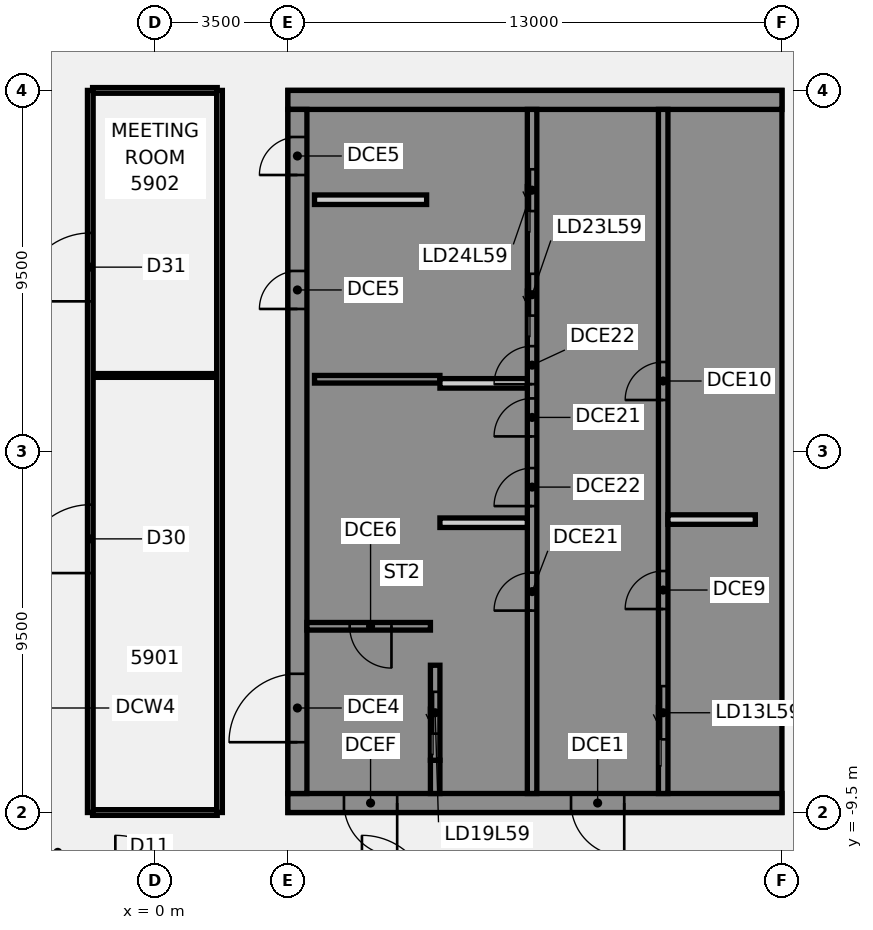
"""IFC4 building model, lengths in metres.
Left out: names, types, materials, properties, quantities, classifications, styles, units other than length and angle.
Written with IfcOpenShell. Run it as: python <this file> out.ifc"""

import sys

from ifc_helpers import new_model, si_unit, direction, frame, frame_2d, origin, place, context, subcontext, project, spatial, polyline, rectangle, outline, extrude, element, fill, save


model = new_model("IFC4")
c1 = context("Model", 3, precision=1e-05, world=origin(), true_north=direction((0.0, 1.0)))
c2 = subcontext(c1, "Body", "Model", "MODEL_VIEW")
j1 = project(units=[si_unit("LENGTHUNIT", "METRE"), si_unit("PLANEANGLEUNIT", "RADIAN")], contexts=[c1])
p1 = place(None, origin())
s1 = spatial("IfcSite", under=j1, at=p1, CompositionType="ELEMENT")
p2 = place(p1, origin())
s2 = spatial("IfcBuilding", under=s1, at=p2, CompositionType="ELEMENT")
p3 = place(p2, frame((0.0, 0.0, 234.3)))
s3 = spatial("IfcBuildingStorey", under=s2, at=p3, CompositionType="ELEMENT", Elevation=234.3)
p4 = place(p3, frame((-1.64, -9.5, 0.0), z_axis=(0.0, 0.0, 1.0), x_axis=(1.0, 0.0, 0.0)))
e1 = element("IfcWall", 1, at=p4, inside=s3, PredefinedType="PARTITIONING", context=c2, shape_type="SweptSolid", body=[
    extrude(rectangle(XDim=3.28, YDim=0.15, at=frame_2d((1.64, 0.0))), origin(), (0.0, 0.0, 1.0), 2.864),
])
p5 = place(p3, frame((-1.64, 2.0, 0.0), z_axis=(0.0, 0.0, 1.0), x_axis=(1.0, 0.0, 0.0)))
e2 = element("IfcWall", 2, at=p5, inside=s3, PredefinedType="PARTITIONING", context=c2, shape_type="SweptSolid", body=[
    extrude(rectangle(XDim=3.28, YDim=0.1, at=frame_2d((1.64, 0.0))), origin(), (0.0, 0.0, 1.0), 2.864),
])
p6 = place(p3, frame((-1.64, 9.5, 0.0), z_axis=(0.0, 0.0, 1.0), x_axis=(1.0, 0.0, 0.0)))
e3 = element("IfcWall", 3, at=p6, inside=s3, PredefinedType="PARTITIONING", context=c2, shape_type="SweptSolid", body=[
    extrude(rectangle(XDim=3.28, YDim=0.15, at=frame_2d((1.64, 0.0))), origin(), (0.0, 0.0, 1.0), 2.864),
])
p7 = place(p3, frame((-1.7, -9.5, 0.0), z_axis=(0.0, 0.0, 1.0), x_axis=(0.0, 1.0, 0.0)))
e4 = element("IfcWall", 4, at=p7, inside=s3, PredefinedType="PARTITIONING", context=c2, shape_type="SweptSolid", body=[
    extrude(rectangle(XDim=19.0, YDim=0.15, at=frame_2d((9.5, 0.0))), origin(), (0.0, 0.0, 1.0), 2.864),
])
p8 = place(p7, frame((6.3, 0.0, 0.0)))
e5 = element("IfcOpeningElement", 5, at=p8, cuts=e4, PredefinedType="OPENING", context=c2, shape_type="SweptSolid", body=[
    extrude(rectangle(XDim=1.8, YDim=2.1, at=frame_2d((0.9, 1.05))), frame((0.0, 0.085, 0.0), z_axis=(0.0, -1.0, 0.0), x_axis=(1.0, 0.0, 0.0)), (0.0, 0.0, 1.0), 0.17),
])
p9 = place(p7, frame((13.45, 0.0, 0.0)))
e6 = element("IfcOpeningElement", 6, at=p9, cuts=e4, PredefinedType="OPENING", context=c2, shape_type="SweptSolid", body=[
    extrude(rectangle(XDim=1.8, YDim=2.1, at=frame_2d((0.9, 1.05))), frame((0.0, 0.085, 0.0), z_axis=(0.0, -1.0, 0.0), x_axis=(1.0, 0.0, 0.0)), (0.0, 0.0, 1.0), 0.17),
])
p10 = place(p3, frame((1.7, -9.5, 0.0), z_axis=(0.0, 0.0, 1.0), x_axis=(0.0, 1.0, 0.0)))
e7 = element("IfcWall", 7, at=p10, inside=s3, PredefinedType="PARTITIONING", context=c2, shape_type="SweptSolid", body=[
    extrude(rectangle(XDim=19.0, YDim=0.15, at=frame_2d((9.5, 0.0))), origin(), (0.0, 0.0, 1.0), 2.864),
])
p11 = place(p3, frame((16.5, -9.25, 0.0), z_axis=(0.0, 0.0, 1.0), x_axis=(-1.0, 0.0, 0.0)))
e8 = element("IfcWall", 8, at=p11, inside=s3, PredefinedType="SHEAR", context=c2, shape_type="SweptSolid", body=[
    extrude(rectangle(XDim=13.0, YDim=0.5, at=frame_2d((6.5, 0.0))), origin(), (0.0, 0.0, 1.0), 3.46),
])
p12 = place(p11, frame((4.15, 0.0, 0.0)))
e9 = element("IfcOpeningElement", 9, at=p12, cuts=e8, PredefinedType="OPENING", context=c2, shape_type="SweptSolid", body=[
    extrude(rectangle(XDim=1.4, YDim=2.1, at=frame_2d((0.7, 1.05))), frame((0.0, 0.26, 0.0), z_axis=(0.0, -1.0, 0.0), x_axis=(1.0, 0.0, 0.0)), (0.0, 0.0, 1.0), 0.52),
])
p13 = place(p11, frame((10.125, 0.0, 0.0)))
e10 = element("IfcOpeningElement", 10, at=p13, cuts=e8, PredefinedType="OPENING", context=c2, shape_type="SweptSolid", body=[
    extrude(rectangle(XDim=1.4, YDim=2.1, at=frame_2d((0.7, 1.05))), frame((0.0, 0.26, 0.0), z_axis=(0.0, -1.0, 0.0), x_axis=(1.0, 0.0, 0.0)), (0.0, 0.0, 1.0), 0.52),
])
p14 = place(p3, origin())
e11 = element("IfcWall", 11, at=p14, inside=s3, PredefinedType="SHEAR", context=c2, shape_type="SweptSolid", body=[
    extrude(outline(polyline([(13.5, -8.125), (13.5, -9.0), (16.0, -9.0), (16.5, -9.0), (16.5, 9.0), (16.0, 9.0), (13.5, 9.0), (13.5, 8.125), (16.0, 8.125), (16.0, 5.625), (13.5, 5.625), (13.5, 5.375), (16.0, 5.375), (16.0, -5.375), (13.5, -5.375), (13.5, -5.625), (16.0, -5.625), (16.0, -8.125), (13.5, -8.125)])), origin(), (0.0, 0.0, 1.0), 3.46),
])
p15 = place(p3, frame((16.5, 9.25, 0.0), z_axis=(0.0, 0.0, 1.0), x_axis=(-1.0, 0.0, 0.0)))
e12 = element("IfcWall", 12, at=p15, inside=s3, PredefinedType="SHEAR", context=c2, shape_type="SweptSolid", body=[
    extrude(rectangle(XDim=13.0, YDim=0.5, at=frame_2d((6.5, 0.0))), origin(), (0.0, 0.0, 1.0), 3.46),
])
p16 = place(p3, origin())
e13 = element("IfcWall", 13, at=p16, inside=s3, PredefinedType="SHEAR", context=c2, shape_type="SweptSolid", body=[
    extrude(outline(polyline([(9.8, -5.375), (7.5, -5.375), (7.5, 2.625), (9.8, 2.625), (9.8, 2.875), (7.5, 2.875), (7.5, 5.375), (9.8, 5.375), (9.8, 5.625), (7.5, 5.625), (7.5, 8.125), (9.8, 8.125), (9.8, 9.0), (7.5, 9.0), (7.25, 9.0), (7.25, -5.625), (7.5, -5.625), (9.8, -5.625), (9.8, -5.375)])), origin(), (0.0, 0.0, 1.0), 3.46),
])
p17 = place(p3, origin())
e14 = element("IfcWall", 14, at=p17, inside=s3, PredefinedType="SHEAR", context=c2, shape_type="SweptSolid", body=[
    extrude(outline(polyline([(7.5, -8.125), (7.5, -9.0), (9.8, -9.0), (9.8, -8.125), (9.8, -5.625), (9.55, -5.625), (9.55, -8.125), (7.5, -8.125)])), origin(), (0.0, 0.0, 1.0), 3.46),
])
p18 = place(p3, frame((7.375, -9.0, 0.0), z_axis=(0.0, 0.0, 1.0), x_axis=(0.0, 1.0, 0.0)))
e15 = element("IfcWall", 15, at=p18, inside=s3, PredefinedType="SHEAR", context=c2, shape_type="SweptSolid", body=[
    extrude(rectangle(XDim=0.875, YDim=0.25, at=frame_2d((0.438, 0.0))), origin(), (0.0, 0.0, 1.0), 3.46),
])
p19 = place(p3, frame((7.5, 1.9, 0.0), z_axis=(0.0, 0.0, 1.0), x_axis=(-1.0, 0.0, 0.0)))
e16 = element("IfcWall", 16, at=p19, inside=s3, PredefinedType="SHEAR", context=c2, shape_type="SweptSolid", body=[
    extrude(rectangle(XDim=3.3, YDim=0.2, at=frame_2d((1.65, 0.0))), origin(), (0.0, 0.0, 1.0), 3.46),
])
p20 = place(p3, frame((13.375, -9.0, 0.0), z_axis=(0.0, 0.0, 1.0), x_axis=(0.0, 1.0, 0.0)))
e17 = element("IfcWall", 17, at=p20, inside=s3, PredefinedType="SHEAR", context=c2, shape_type="SweptSolid", body=[
    extrude(rectangle(XDim=18.0, YDim=0.25, at=frame_2d((9.0, 0.0))), origin(), (0.0, 0.0, 1.0), 3.46),
])
p21 = place(p20, frame((1.425, 0.0, 0.0)))
e18 = element("IfcOpeningElement", 18, at=p21, cuts=e17, PredefinedType="OPENING", context=c2, shape_type="SweptSolid", body=[
    extrude(rectangle(XDim=1.4, YDim=2.1, at=frame_2d((0.7, 1.05))), frame((0.0, 0.135, 0.0), z_axis=(0.0, -1.0, 0.0), x_axis=(1.0, 0.0, 0.0)), (0.0, 0.0, 1.0), 0.27),
])
p22 = place(p20, frame((4.854, 0.0, 0.0)))
e19 = element("IfcOpeningElement", 19, at=p22, cuts=e17, PredefinedType="OPENING", context=c2, shape_type="SweptSolid", body=[
    extrude(rectangle(XDim=1.0, YDim=2.1, at=frame_2d((0.5, 1.05))), frame((0.0, 0.135, 0.0), z_axis=(0.0, -1.0, 0.0), x_axis=(1.0, 0.0, 0.0)), (0.0, 0.0, 1.0), 0.27),
])
p23 = place(p20, frame((10.354, 0.0, 0.0)))
e20 = element("IfcOpeningElement", 20, at=p23, cuts=e17, PredefinedType="OPENING", context=c2, shape_type="SweptSolid", body=[
    extrude(rectangle(XDim=1.0, YDim=2.1, at=frame_2d((0.5, 1.05))), frame((0.0, 0.135, 0.0), z_axis=(0.0, -1.0, 0.0), x_axis=(1.0, 0.0, 0.0)), (0.0, 0.0, 1.0), 0.27),
])
p24 = place(p3, frame((9.925, -9.0, 0.0), z_axis=(0.0, 0.0, 1.0), x_axis=(0.0, 1.0, 0.0)))
e21 = element("IfcWall", 21, at=p24, inside=s3, PredefinedType="SHEAR", context=c2, shape_type="SweptSolid", body=[
    extrude(rectangle(XDim=18.0, YDim=0.25, at=frame_2d((9.0, 0.0))), origin(), (0.0, 0.0, 1.0), 3.46),
])
p25 = place(p24, frame((12.575, 0.0, 0.0)))
e22 = element("IfcOpeningElement", 22, at=p25, cuts=e21, PredefinedType="OPENING", context=c2, shape_type="SweptSolid", body=[
    extrude(rectangle(XDim=1.1, YDim=2.1, at=frame_2d((0.55, 1.05))), frame((0.0, 0.135, 0.0), z_axis=(0.0, -1.0, 0.0), x_axis=(1.0, 0.0, 0.0)), (0.0, 0.0, 1.0), 0.27),
])
p26 = place(p24, frame((15.325, 0.0, 0.0)))
e23 = element("IfcOpeningElement", 23, at=p26, cuts=e21, PredefinedType="OPENING", context=c2, shape_type="SweptSolid", body=[
    extrude(rectangle(XDim=1.1, YDim=2.1, at=frame_2d((0.55, 1.05))), frame((0.0, 0.135, 0.0), z_axis=(0.0, -1.0, 0.0), x_axis=(1.0, 0.0, 0.0)), (0.0, 0.0, 1.0), 0.27),
])
p27 = place(p24, frame((4.812, 0.0, 0.0)))
e24 = element("IfcOpeningElement", 24, at=p27, cuts=e21, PredefinedType="OPENING", context=c2, shape_type="SweptSolid", body=[
    extrude(rectangle(XDim=1.0, YDim=2.1, at=frame_2d((0.5, 1.05))), frame((0.0, 0.135, 0.0), z_axis=(0.0, -1.0, 0.0), x_axis=(1.0, 0.0, 0.0)), (0.0, 0.0, 1.0), 0.27),
])
p28 = place(p24, frame((7.562, 0.0, 0.0)))
e25 = element("IfcOpeningElement", 25, at=p28, cuts=e21, PredefinedType="OPENING", context=c2, shape_type="SweptSolid", body=[
    extrude(rectangle(XDim=1.0, YDim=2.1, at=frame_2d((0.5, 1.05))), frame((0.0, 0.135, 0.0), z_axis=(0.0, -1.0, 0.0), x_axis=(1.0, 0.0, 0.0)), (0.0, 0.0, 1.0), 0.27),
])
p29 = place(p24, frame((9.396, 0.0, 0.0)))
e26 = element("IfcOpeningElement", 26, at=p29, cuts=e21, PredefinedType="OPENING", context=c2, shape_type="SweptSolid", body=[
    extrude(rectangle(XDim=1.0, YDim=2.1, at=frame_2d((0.5, 1.05))), frame((0.0, 0.135, 0.0), z_axis=(0.0, -1.0, 0.0), x_axis=(1.0, 0.0, 0.0)), (0.0, 0.0, 1.0), 0.27),
])
p30 = place(p24, frame((10.771, 0.0, 0.0)))
e27 = element("IfcOpeningElement", 27, at=p30, cuts=e21, PredefinedType="OPENING", context=c2, shape_type="SweptSolid", body=[
    extrude(rectangle(XDim=1.0, YDim=2.1, at=frame_2d((0.5, 1.05))), frame((0.0, 0.135, 0.0), z_axis=(0.0, -1.0, 0.0), x_axis=(1.0, 0.0, 0.0)), (0.0, 0.0, 1.0), 0.27),
])
p31 = place(p3, frame((7.375, -8.125, 0.0), z_axis=(0.0, 0.0, 1.0), x_axis=(0.0, 1.0, 0.0)))
e28 = element("IfcWall", 28, at=p31, inside=s3, PredefinedType="SHEAR", context=c2, shape_type="SweptSolid", body=[
    extrude(rectangle(XDim=2.5, YDim=0.25, at=frame_2d((1.25, 0.0))), origin(), (0.0, 0.0, 1.0), 3.46),
])
p32 = place(p31, frame((0.7, 0.0, 0.0)))
e29 = element("IfcOpeningElement", 29, at=p32, cuts=e28, PredefinedType="OPENING", context=c2, shape_type="SweptSolid", body=[
    extrude(rectangle(XDim=1.1, YDim=2.1, at=frame_2d((0.55, 1.05))), frame((0.0, 0.135, 0.0), z_axis=(0.0, -1.0, 0.0), x_axis=(1.0, 0.0, 0.0)), (0.0, 0.0, 1.0), 0.27),
])
p33 = place(p3, frame((3.75, -9.0, 0.0), z_axis=(0.0, 0.0, 1.0), x_axis=(0.0, 1.0, 0.0)))
e30 = element("IfcWall", 30, at=p33, inside=s3, PredefinedType="SHEAR", context=c2, shape_type="SweptSolid", body=[
    extrude(rectangle(XDim=18.0, YDim=0.5, at=frame_2d((9.0, 0.0))), origin(), (0.0, 0.0, 1.0), 3.46),
])
p34 = place(p33, frame((1.35, 0.0, 0.0)))
e31 = element("IfcOpeningElement", 31, at=p34, cuts=e30, PredefinedType="OPENING", context=c2, shape_type="SweptSolid", body=[
    extrude(rectangle(XDim=1.8, YDim=2.1, at=frame_2d((0.9, 1.05))), frame((0.0, 0.26, 0.0), z_axis=(0.0, -1.0, 0.0), x_axis=(1.0, 0.0, 0.0)), (0.0, 0.0, 1.0), 0.52),
])
p35 = place(p33, frame((12.75, 0.0, 0.0)))
e32 = element("IfcOpeningElement", 32, at=p35, cuts=e30, PredefinedType="OPENING", context=c2, shape_type="SweptSolid", body=[
    extrude(rectangle(XDim=1.0, YDim=2.1, at=frame_2d((0.5, 1.05))), frame((0.0, 0.26, 0.0), z_axis=(0.0, -1.0, 0.0), x_axis=(1.0, 0.0, 0.0)), (0.0, 0.0, 1.0), 0.52),
])
p36 = place(p33, frame((16.274, 0.0, 0.0)))
e33 = element("IfcOpeningElement", 33, at=p36, cuts=e30, PredefinedType="OPENING", context=c2, shape_type="SweptSolid", body=[
    extrude(rectangle(XDim=1.0, YDim=2.1, at=frame_2d((0.5, 1.05))), frame((0.0, 0.26, 0.0), z_axis=(0.0, -1.0, 0.0), x_axis=(1.0, 0.0, 0.0)), (0.0, 0.0, 1.0), 0.52),
])
p37 = place(p3, frame((7.15, 6.624, 0.0), z_axis=(0.0, 0.0, 1.0), x_axis=(-1.0, 0.0, 0.0)))
e34 = element("IfcWall", 34, at=p37, inside=s3, PredefinedType="PARTITIONING", context=c2, shape_type="SweptSolid", body=[
    extrude(rectangle(XDim=2.95, YDim=0.25, at=frame_2d((1.475, 0.0))), origin(), (0.0, 0.0, 1.0), 3.46),
])
p38 = place(p3, frame((7.25, -4.6, 0.0), z_axis=(0.0, 0.0, 1.0), x_axis=(-1.0, 0.0, 0.0)))
e35 = element("IfcWall", 35, at=p38, inside=s3, PredefinedType="SHEAR", context=c2, shape_type="SweptSolid", body=[
    extrude(rectangle(XDim=3.25, YDim=0.2, at=frame_2d((1.625, 0.0))), origin(), (0.0, 0.0, 1.0), 3.46),
])
p39 = place(p38, frame((1.025, 0.0, 0.0)))
e36 = element("IfcOpeningElement", 36, at=p39, cuts=e35, PredefinedType="OPENING", context=c2, shape_type="SweptSolid", body=[
    extrude(rectangle(XDim=1.1, YDim=2.1, at=frame_2d((0.55, 1.05))), frame((0.0, 0.11, 0.0), z_axis=(0.0, -1.0, 0.0), x_axis=(1.0, 0.0, 0.0)), (0.0, 0.0, 1.0), 0.22),
])
for number, where, z_axis, x_axis in (
    (37, (15.8, -1.792, 0.0), (0.0, 0.0, 1.0), (-1.0, 0.0, 0.0)),
    (38, (9.8, -1.875, 0.0), (0.0, 0.0, 1.0), (-1.0, 0.0, 0.0)),
    (39, (9.8, 1.792, 0.0), (0.0, 0.0, 1.0), (-1.0, 0.0, 0.0)),
):
    element("IfcWall", number, at=place(p3, frame(where, z_axis=z_axis, x_axis=x_axis)), inside=s3, PredefinedType="PARTITIONING", context=c2, shape_type="SweptSolid", body=[
        extrude(rectangle(XDim=2.3, YDim=0.25, at=frame_2d((1.15, 0.0))), origin(), (0.0, 0.0, 1.0), 3.46),
    ])
p40 = place(p8, frame((1.8, 0.0, 0.0), z_axis=(0.0, 0.0, 1.0), x_axis=(-1.0, 0.0, 0.0)))
e40 = element("IfcDoor", 40, at=p40, inside=s3, OperationType="DOUBLE_DOOR_SINGLE_SWING", PredefinedType="DOOR", context=c2, shape_type="SweptSolid", body=[
    extrude(rectangle(XDim=1.8, YDim=2.1, at=frame_2d((0.9, 1.05))), frame((0.0, 0.025, 0.0), z_axis=(0.0, -1.0, 0.0), x_axis=(1.0, 0.0, 0.0)), (0.0, 0.0, 1.0), 0.05),
])
fill(e5, e40)
p41 = place(p9, frame((1.8, 0.0, 0.0), z_axis=(0.0, 0.0, 1.0), x_axis=(-1.0, 0.0, 0.0)))
e41 = element("IfcDoor", 41, at=p41, inside=s3, OperationType="DOUBLE_DOOR_SINGLE_SWING", PredefinedType="DOOR", context=c2, shape_type="SweptSolid", body=[
    extrude(rectangle(XDim=1.8, YDim=2.1, at=frame_2d((0.9, 1.05))), frame((0.0, 0.025, 0.0), z_axis=(0.0, -1.0, 0.0), x_axis=(1.0, 0.0, 0.0)), (0.0, 0.0, 1.0), 0.05),
])
fill(e6, e41)
p42 = place(p12, origin())
e42 = element("IfcDoor", 42, at=p42, inside=s3, OperationType="SINGLE_SWING_LEFT", PredefinedType="DOOR", context=c2, shape_type="SweptSolid", body=[
    extrude(rectangle(XDim=1.4, YDim=2.1, at=frame_2d((0.7, 1.05))), frame((0.0, 0.025, 0.0), z_axis=(0.0, -1.0, 0.0), x_axis=(1.0, 0.0, 0.0)), (0.0, 0.0, 1.0), 0.05),
])
fill(e9, e42)
p43 = place(p13, origin())
e43 = element("IfcDoor", 43, at=p43, inside=s3, OperationType="SINGLE_SWING_LEFT", PredefinedType="DOOR", context=c2, shape_type="SweptSolid", body=[
    extrude(rectangle(XDim=1.4, YDim=2.1, at=frame_2d((0.7, 1.05))), frame((0.0, 0.025, 0.0), z_axis=(0.0, -1.0, 0.0), x_axis=(1.0, 0.0, 0.0)), (0.0, 0.0, 1.0), 0.05),
])
fill(e10, e43)
p44 = place(p34, origin())
e44 = element("IfcDoor", 44, at=p44, inside=s3, OperationType="SINGLE_SWING_LEFT", PredefinedType="DOOR", context=c2, shape_type="SweptSolid", body=[
    extrude(rectangle(XDim=1.8, YDim=2.1, at=frame_2d((0.9, 1.05))), frame((0.0, 0.025, 0.0), z_axis=(0.0, -1.0, 0.0), x_axis=(1.0, 0.0, 0.0)), (0.0, 0.0, 1.0), 0.05),
])
fill(e31, e44)
p45 = place(p35, origin())
e45 = element("IfcDoor", 45, at=p45, inside=s3, OperationType="SINGLE_SWING_LEFT", PredefinedType="DOOR", context=c2, shape_type="SweptSolid", body=[
    extrude(rectangle(XDim=1.0, YDim=2.1, at=frame_2d((0.5, 1.05))), frame((0.0, -0.175, 0.0), z_axis=(0.0, -1.0, 0.0), x_axis=(1.0, 0.0, 0.0)), (0.0, 0.0, 1.0), 0.05),
])
fill(e32, e45)
p46 = place(p36, origin())
e46 = element("IfcDoor", 46, at=p46, inside=s3, OperationType="SINGLE_SWING_LEFT", PredefinedType="DOOR", context=c2, shape_type="SweptSolid", body=[
    extrude(rectangle(XDim=1.0, YDim=2.1, at=frame_2d((0.5, 1.05))), frame((0.0, -0.175, 0.0), z_axis=(0.0, -1.0, 0.0), x_axis=(1.0, 0.0, 0.0)), (0.0, 0.0, 1.0), 0.05),
])
fill(e33, e46)
p47 = place(p39, origin())
e47 = element("IfcDoor", 47, at=p47, inside=s3, OperationType="SINGLE_SWING_LEFT", PredefinedType="DOOR", context=c2, shape_type="SweptSolid", body=[
    extrude(rectangle(XDim=1.1, YDim=2.1, at=frame_2d((0.55, 1.05))), frame((0.0, 0.025, 0.0), z_axis=(0.0, -1.0, 0.0), x_axis=(1.0, 0.0, 0.0)), (0.0, 0.0, 1.0), 0.05),
])
fill(e36, e47)
p48 = place(p21, origin())
e48 = element("IfcDoor", 48, at=p48, inside=s3, OperationType="SLIDING_TO_LEFT", PredefinedType="DOOR", context=c2, shape_type="SweptSolid", body=[
    extrude(rectangle(XDim=1.4, YDim=2.1, at=frame_2d((0.7, 1.05))), frame((0.0, 0.025, 0.0), z_axis=(0.0, -1.0, 0.0), x_axis=(1.0, 0.0, 0.0)), (0.0, 0.0, 1.0), 0.05),
])
fill(e18, e48)
p49 = place(p32, origin())
e49 = element("IfcDoor", 49, at=p49, inside=s3, OperationType="SLIDING_TO_LEFT", PredefinedType="DOOR", context=c2, shape_type="SweptSolid", body=[
    extrude(rectangle(XDim=1.1, YDim=2.1, at=frame_2d((0.55, 1.05))), frame((0.0, 0.025, 0.0), z_axis=(0.0, -1.0, 0.0), x_axis=(1.0, 0.0, 0.0)), (0.0, 0.0, 1.0), 0.05),
])
fill(e29, e49)
p50 = place(p25, origin())
e50 = element("IfcDoor", 50, at=p50, inside=s3, OperationType="SLIDING_TO_LEFT", PredefinedType="DOOR", context=c2, shape_type="SweptSolid", body=[
    extrude(rectangle(XDim=1.1, YDim=2.1, at=frame_2d((0.55, 1.05))), frame((0.0, 0.025, 0.0), z_axis=(0.0, -1.0, 0.0), x_axis=(1.0, 0.0, 0.0)), (0.0, 0.0, 1.0), 0.05),
])
fill(e22, e50)
p51 = place(p26, origin())
e51 = element("IfcDoor", 51, at=p51, inside=s3, OperationType="SLIDING_TO_LEFT", PredefinedType="DOOR", context=c2, shape_type="SweptSolid", body=[
    extrude(rectangle(XDim=1.1, YDim=2.1, at=frame_2d((0.55, 1.05))), frame((0.0, 0.025, 0.0), z_axis=(0.0, -1.0, 0.0), x_axis=(1.0, 0.0, 0.0)), (0.0, 0.0, 1.0), 0.05),
])
fill(e23, e51)
p52 = place(p22, origin())
e52 = element("IfcDoor", 52, at=p52, inside=s3, OperationType="SINGLE_SWING_LEFT", PredefinedType="DOOR", context=c2, shape_type="SweptSolid", body=[
    extrude(rectangle(XDim=1.0, YDim=2.1, at=frame_2d((0.5, 1.05))), frame((0.0, 0.025, 0.0), z_axis=(0.0, -1.0, 0.0), x_axis=(1.0, 0.0, 0.0)), (0.0, 0.0, 1.0), 0.05),
])
fill(e19, e52)
p53 = place(p23, origin())
e53 = element("IfcDoor", 53, at=p53, inside=s3, OperationType="SINGLE_SWING_LEFT", PredefinedType="DOOR", context=c2, shape_type="SweptSolid", body=[
    extrude(rectangle(XDim=1.0, YDim=2.1, at=frame_2d((0.5, 1.05))), frame((0.0, 0.025, 0.0), z_axis=(0.0, -1.0, 0.0), x_axis=(1.0, 0.0, 0.0)), (0.0, 0.0, 1.0), 0.05),
])
fill(e20, e53)
p54 = place(p27, origin())
e54 = element("IfcDoor", 54, at=p54, inside=s3, OperationType="SINGLE_SWING_LEFT", PredefinedType="DOOR", context=c2, shape_type="SweptSolid", body=[
    extrude(rectangle(XDim=1.0, YDim=2.1, at=frame_2d((0.5, 1.05))), frame((0.0, 0.025, 0.0), z_axis=(0.0, -1.0, 0.0), x_axis=(1.0, 0.0, 0.0)), (0.0, 0.0, 1.0), 0.05),
])
fill(e24, e54)
p55 = place(p28, origin())
e55 = element("IfcDoor", 55, at=p55, inside=s3, OperationType="SINGLE_SWING_LEFT", PredefinedType="DOOR", context=c2, shape_type="SweptSolid", body=[
    extrude(rectangle(XDim=1.0, YDim=2.1, at=frame_2d((0.5, 1.05))), frame((0.0, 0.025, 0.0), z_axis=(0.0, -1.0, 0.0), x_axis=(1.0, 0.0, 0.0)), (0.0, 0.0, 1.0), 0.05),
])
fill(e25, e55)
p56 = place(p29, origin())
e56 = element("IfcDoor", 56, at=p56, inside=s3, OperationType="SINGLE_SWING_LEFT", PredefinedType="DOOR", context=c2, shape_type="SweptSolid", body=[
    extrude(rectangle(XDim=1.0, YDim=2.1, at=frame_2d((0.5, 1.05))), frame((0.0, 0.025, 0.0), z_axis=(0.0, -1.0, 0.0), x_axis=(1.0, 0.0, 0.0)), (0.0, 0.0, 1.0), 0.05),
])
fill(e26, e56)
p57 = place(p30, origin())
e57 = element("IfcDoor", 57, at=p57, inside=s3, OperationType="SINGLE_SWING_LEFT", PredefinedType="DOOR", context=c2, shape_type="SweptSolid", body=[
    extrude(rectangle(XDim=1.0, YDim=2.1, at=frame_2d((0.5, 1.05))), frame((0.0, 0.025, 0.0), z_axis=(0.0, -1.0, 0.0), x_axis=(1.0, 0.0, 0.0)), (0.0, 0.0, 1.0), 0.05),
])
fill(e27, e57)
save(model, sys.argv[1])
